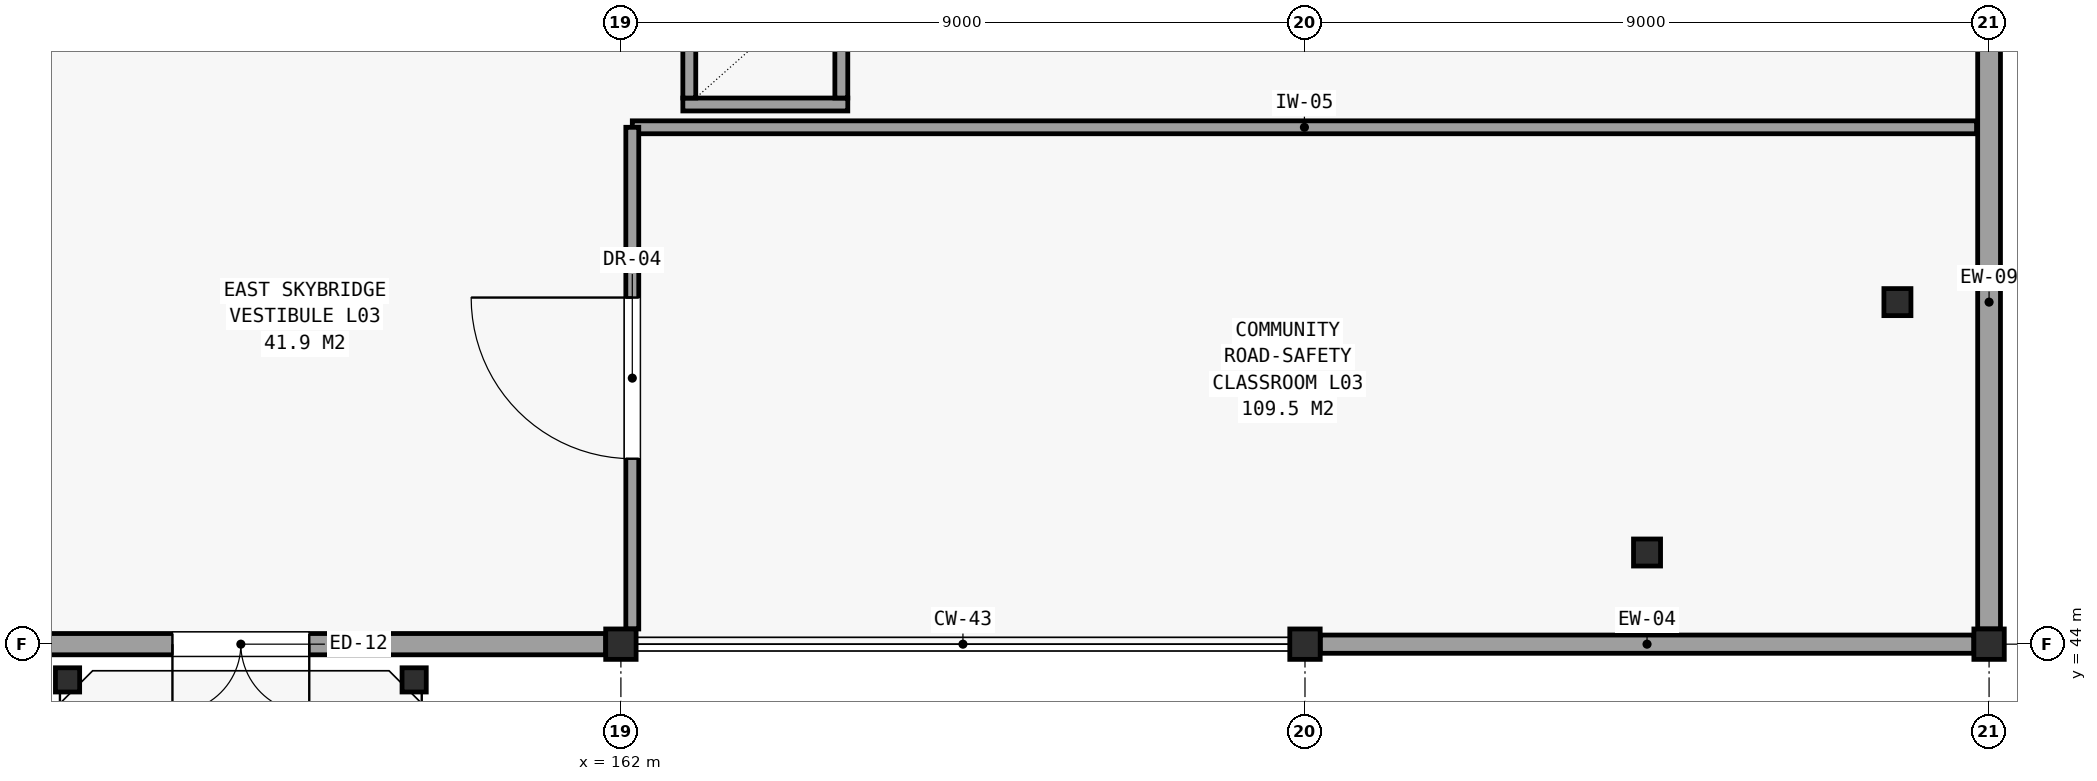
"""IFC4 building model, lengths in metres.
Left out: names, types, materials, properties, quantities, classifications, styles, units other than length and angle.
Written with IfcOpenShell. Run it as: python <this file> out.ifc"""

import sys

from ifc_helpers import new_model, si_unit, direction, frame, frame_2d, origin, origin_2d, place, context, subcontext, project, spatial, rectangle, hollow_rectangle, hollow_circle, extrude, element, fill, save


model = new_model("IFC4")
c1 = context("Model", 3, precision=1e-05, world=origin(), true_north=direction((0.0, 1.0)))
c2 = subcontext(c1, "Body", "Model", "MODEL_VIEW")
j1 = project(units=[si_unit("LENGTHUNIT", "METRE"), si_unit("PLANEANGLEUNIT", "RADIAN")], contexts=[c1])
p1 = place(None, origin())
s1 = spatial("IfcSite", under=j1, at=p1, CompositionType="ELEMENT")
p2 = place(p1, origin())
s2 = spatial("IfcBuilding", under=s1, at=p2, CompositionType="ELEMENT")
p3 = place(p2, frame((0.0, 0.0, 13.5)))
s3 = spatial("IfcBuildingStorey", under=s2, at=p3, CompositionType="ELEMENT", Elevation=13.5)
for number, where, z_axis, x_axis in (
    (1, (154.72, 43.53, 0.0), (0.0, 0.0, 1.0), (1.0, 0.0, 0.0)),
    (2, (159.28, 43.53, 0.0), (0.0, 0.0, 1.0), (1.0, 0.0, 0.0)),
):
    element("IfcColumn", number, at=place(p3, frame(where, z_axis=z_axis, x_axis=x_axis)), inside=s3, PredefinedType="COLUMN", context=c2, shape_type="SweptSolid", body=[
        extrude(hollow_circle(Radius=0.159, WallThickness=0.01, at=origin_2d()), origin(), (0.0, 0.0, 1.0), 4.2),
    ])
for number, where, z_axis, x_axis in (
    (3, (162.0, 44.0, 0.0), (0.0, 0.0, 1.0), (1.0, 0.0, 0.0)),
    (4, (171.0, 44.0, 0.0), (0.0, 0.0, 1.0), (1.0, 0.0, 0.0)),
):
    element("IfcColumn", number, at=place(p3, frame(where, z_axis=z_axis, x_axis=x_axis)), inside=s3, PredefinedType="COLUMN", context=c2, shape_type="SweptSolid", body=[
        extrude(hollow_rectangle(XDim=0.4, YDim=0.4, WallThickness=0.019, at=origin_2d()), origin(), (0.0, 0.0, 1.0), 4.2),
    ])
for number, where, z_axis, x_axis in (
    (5, (175.5, 45.206, 0.0), (0.0, 0.0, 1.0), (1.0, 0.0, 0.0)),
    (6, (178.794, 48.5, 0.0), (0.0, 0.0, 1.0), (1.0, 0.0, 0.0)),
):
    element("IfcColumn", number, at=place(p3, frame(where, z_axis=z_axis, x_axis=x_axis)), inside=s3, PredefinedType="COLUMN", context=c2, shape_type="SweptSolid", body=[
        extrude(hollow_circle(Radius=0.178, WallThickness=0.013, at=origin_2d()), origin(), (0.0, 0.0, 1.0), 4.2),
    ])
p4 = place(p3, frame((180.0, 44.0, 0.0), z_axis=(0.0, 0.0, 1.0), x_axis=(1.0, 0.0, 0.0)))
e7 = element("IfcColumn", 7, at=p4, inside=s3, PredefinedType="COLUMN", context=c2, shape_type="SweptSolid", body=[
    extrude(hollow_rectangle(XDim=0.4, YDim=0.4, WallThickness=0.019, at=origin_2d()), origin(), (0.0, 0.0, 1.0), 4.14),
])
p5 = place(p3, frame((153.2, 44.0, 0.0), z_axis=(0.0, 0.0, 1.0), x_axis=(1.0, 0.0, 0.0)))
e8 = element("IfcWall", 8, at=p5, inside=s3, PredefinedType="SOLIDWALL", context=c2, shape_type="SweptSolid", body=[
    extrude(rectangle(XDim=8.6, YDim=0.28, at=frame_2d((4.3, 0.0))), origin(), (0.0, 0.0, 1.0), 3.3),
])
p6 = place(p5, frame((4.7, 0.0, 0.0), z_axis=(0.0, 0.0, 1.0), x_axis=(-1.0, 0.0, 0.0)))
e9 = element("IfcOpeningElement", 9, at=p6, cuts=e8, PredefinedType="OPENING", context=c2, shape_type="SweptSolid", body=[
    extrude(rectangle(XDim=1.8, YDim=2.2, at=frame_2d((0.9, 1.1))), frame((0.0, 0.151, 0.0), z_axis=(0.0, -1.0, 0.0), x_axis=(1.0, 0.0, 0.0)), (0.0, 0.0, 1.0), 0.302),
])
p7 = place(p3, frame((171.2, 44.0, 0.0), z_axis=(0.0, 0.0, 1.0), x_axis=(1.0, 0.0, 0.0)))
e10 = element("IfcWall", 10, at=p7, inside=s3, PredefinedType="SOLIDWALL", context=c2, shape_type="SweptSolid", body=[
    extrude(rectangle(XDim=8.6, YDim=0.24, at=frame_2d((4.3, 0.0))), origin(), (0.0, 0.0, 1.0), 3.29),
])
p8 = place(p3, frame((180.0, 44.2, 0.0), z_axis=(0.0, 0.0, 1.0), x_axis=(0.0, 1.0, 0.0)))
e11 = element("IfcWall", 11, at=p8, inside=s3, PredefinedType="SOLIDWALL", context=c2, shape_type="SweptSolid", body=[
    extrude(rectangle(XDim=8.6, YDim=0.3, at=frame_2d((4.3, 0.0))), origin(), (0.0, 0.0, 1.0), 3.29),
])
p9 = place(p3, frame((162.815, 51.1, 0.0), z_axis=(0.0, 0.0, 1.0), x_axis=(1.0, 0.0, 0.0)))
e12 = element("IfcWall", 12, at=p9, inside=s3, PredefinedType="PARTITIONING", context=c2, shape_type="SweptSolid", body=[
    extrude(rectangle(XDim=2.17, YDim=0.17, at=frame_2d((1.085, 0.0))), origin(), (0.0, 0.0, 1.0), 3.92),
])
for number, where, z_axis, x_axis in (
    (13, (162.9, 51.185, 0.0), (0.0, 0.0, 1.0), (0.0, 1.0, 0.0)),
    (14, (164.9, 51.185, 0.0), (0.0, 0.0, 1.0), (0.0, 1.0, 0.0)),
):
    element("IfcWall", number, at=place(p3, frame(where, z_axis=z_axis, x_axis=x_axis)), inside=s3, PredefinedType="PARTITIONING", context=c2, shape_type="SweptSolid", body=[
        extrude(rectangle(XDim=1.63, YDim=0.17, at=frame_2d((0.815, 0.0))), origin(), (0.0, 0.0, 1.0), 3.362),
    ])
p10 = place(p3, frame((162.15, 50.8, 0.0), z_axis=(0.0, 0.0, 1.0), x_axis=(1.0, 0.0, 0.0)))
e15 = element("IfcWall", 15, at=p10, inside=s3, PredefinedType="PARTITIONING", context=c2, shape_type="SweptSolid", body=[
    extrude(rectangle(XDim=17.685, YDim=0.17, at=frame_2d((8.843, 0.0))), origin(), (0.0, 0.0, 1.0), 3.29),
])
p11 = place(p3, frame((162.15, 44.2, 0.0), z_axis=(0.0, 0.0, 1.0), x_axis=(0.0, 1.0, 0.0)))
e16 = element("IfcWall", 16, at=p11, inside=s3, PredefinedType="PARTITIONING", context=c2, shape_type="SweptSolid", body=[
    extrude(rectangle(XDim=6.6, YDim=0.17, at=frame_2d((3.3, 0.0))), origin(), (0.0, 0.0, 1.0), 3.3),
])
p12 = place(p11, frame((2.24, 0.0, 0.0)))
e17 = element("IfcOpeningElement", 17, at=p12, cuts=e16, PredefinedType="OPENING", context=c2, shape_type="SweptSolid", body=[
    extrude(rectangle(XDim=2.12, YDim=2.5, at=frame_2d((1.06, 1.25))), frame((0.0, 0.096, 0.0), z_axis=(0.0, -1.0, 0.0), x_axis=(1.0, 0.0, 0.0)), (0.0, 0.0, 1.0), 0.192),
])
p13 = place(p6, origin())
e18 = element("IfcDoor", 18, at=p13, inside=s3, OperationType="SINGLE_SWING_LEFT", PredefinedType="DOOR", context=c2, shape_type="SweptSolid", body=[
    extrude(rectangle(XDim=1.8, YDim=2.2, at=frame_2d((0.9, 1.1))), frame((0.0, 0.025, 0.0), z_axis=(0.0, -1.0, 0.0), x_axis=(1.0, 0.0, 0.0)), (0.0, 0.0, 1.0), 0.05),
])
fill(e9, e18)
p14 = place(p12, origin())
e19 = element("IfcDoor", 19, at=p14, inside=s3, OperationType="SINGLE_SWING_RIGHT", PredefinedType="DOOR", context=c2, shape_type="SweptSolid", body=[
    extrude(rectangle(XDim=2.12, YDim=2.5, at=frame_2d((1.06, 1.25))), frame((0.0, 0.025, 0.0), z_axis=(0.0, -1.0, 0.0), x_axis=(1.0, 0.0, 0.0)), (0.0, 0.0, 1.0), 0.05),
])
fill(e17, e19)
save(model, sys.argv[1])
